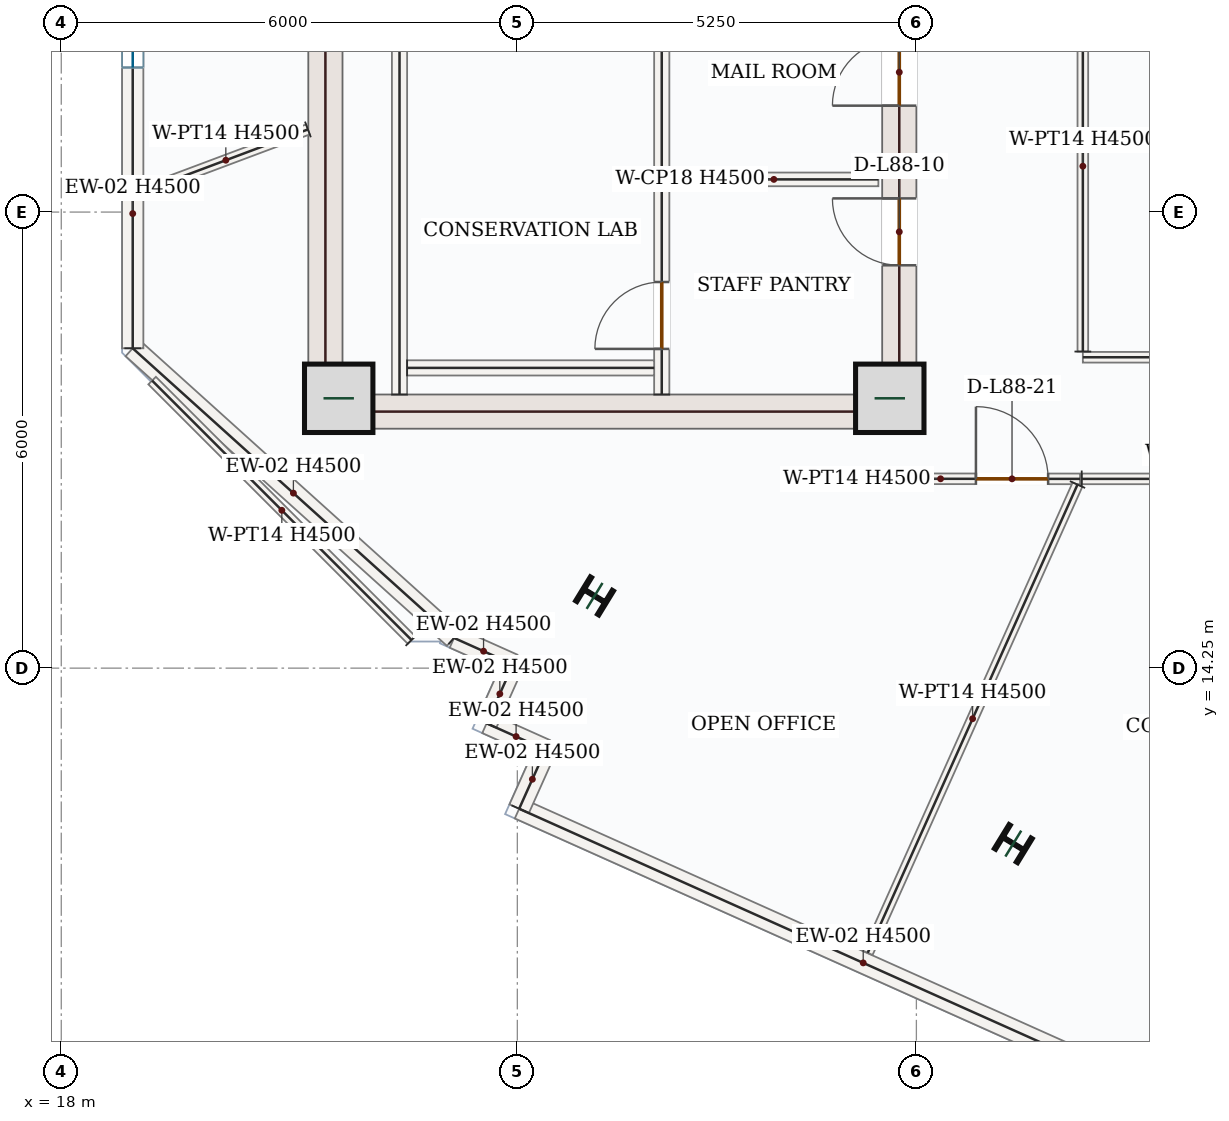
"""IFC4 building model, lengths in metres.
Left out: names, types, materials, properties, quantities, classifications, styles, units other than length and angle.
Written with IfcOpenShell. Run it as: python <this file> out.ifc"""

import sys

from ifc_helpers import new_model, si_unit, direction, frame, frame_2d, origin, origin_2d, place, context, subcontext, project, spatial, rectangle, i_section, extrude, source, transform, mapped, element, fill, save


model = new_model("IFC4")
c1 = context("Model", 3, precision=1e-05, world=origin(), true_north=direction((0.0, 1.0)))
c2 = subcontext(c1, "Body", "Model", "MODEL_VIEW")
j1 = project(units=[si_unit("LENGTHUNIT", "METRE"), si_unit("PLANEANGLEUNIT", "RADIAN")], contexts=[c1])
p1 = place(None, origin())
s1 = spatial("IfcSite", under=j1, at=p1, CompositionType="ELEMENT")
p2 = place(p1, origin())
s2 = spatial("IfcBuilding", under=s1, at=p2, CompositionType="ELEMENT")
p3 = place(p2, frame((0.0, 0.0, 361.05)))
s3 = spatial("IfcBuildingStorey", under=s2, at=p3, CompositionType="ELEMENT", Elevation=361.05)
m1 = source(origin(), c2, "Body", "SweptSolid", [
    extrude(rectangle(XDim=8.55, YDim=0.45, at=frame_2d((4.275, 0.0))), origin(), (0.0, 0.0, 1.0), 4.5),
])
p4 = place(p3, frame((21.475, 17.4, 0.0), z_axis=(0.0, 0.0, 1.0), x_axis=(0.0, 1.0, 0.0)))
e1 = element("IfcWall", 1, at=p4, inside=s3, PredefinedType="SHEAR", context=c2, shape_type="MappedRepresentation", body=[
    mapped(m1, transform((0.0, 0.0, 0.0), x_axis=(1.0, 0.0, 0.0), y_axis=(0.0, 1.0, 0.0), z_axis=(0.0, 0.0, 1.0), scale=1.0)),
])
p5 = place(p3, frame((29.025, 17.4, 0.0), z_axis=(0.0, 0.0, 1.0), x_axis=(0.0, 1.0, 0.0)))
e2 = element("IfcWall", 2, at=p5, inside=s3, PredefinedType="SHEAR", context=c2, shape_type="SweptSolid", body=[
    extrude(rectangle(XDim=8.55, YDim=0.45, at=frame_2d((4.275, 0.0))), origin(), (0.0, 0.0, 1.0), 4.5),
])
p6 = place(p5, frame((6.65, 0.0, 0.0)))
e3 = element("IfcOpeningElement", 3, at=p6, cuts=e2, PredefinedType="OPENING", context=c2, shape_type="SweptSolid", body=[
    extrude(rectangle(XDim=1.1, YDim=2.2, at=frame_2d((0.55, 1.1))), frame((0.0, 0.235, 0.0), z_axis=(0.0, -1.0, 0.0), x_axis=(1.0, 0.0, 0.0)), (0.0, 0.0, 1.0), 0.47),
])
p7 = place(p5, frame((2.15, 0.0, 0.0)))
e4 = element("IfcOpeningElement", 4, at=p7, cuts=e2, PredefinedType="OPENING", context=c2, shape_type="SweptSolid", body=[
    extrude(rectangle(XDim=0.88, YDim=2.1, at=frame_2d((0.44, 1.05))), frame((0.0, 0.235, 0.0), z_axis=(0.0, -1.0, 0.0), x_axis=(1.0, 0.0, 0.0)), (0.0, 0.0, 1.0), 0.47),
])
p8 = place(p5, frame((4.25, 0.0, 0.0)))
e5 = element("IfcOpeningElement", 5, at=p8, cuts=e2, PredefinedType="OPENING", context=c2, shape_type="SweptSolid", body=[
    extrude(rectangle(XDim=0.88, YDim=2.1, at=frame_2d((0.44, 1.05))), frame((0.0, 0.235, 0.0), z_axis=(0.0, -1.0, 0.0), x_axis=(1.0, 0.0, 0.0)), (0.0, 0.0, 1.0), 0.47),
])
m2 = source(origin(), c2, "Body", "SweptSolid", [
    extrude(rectangle(XDim=7.1, YDim=0.45, at=frame_2d((3.55, 0.0))), origin(), (0.0, 0.0, 1.0), 4.5),
])
p9 = place(p3, frame((21.7, 17.625, 0.0), z_axis=(0.0, 0.0, 1.0), x_axis=(1.0, 0.0, 0.0)))
e6 = element("IfcWall", 6, at=p9, inside=s3, PredefinedType="SHEAR", context=c2, shape_type="MappedRepresentation", body=[
    mapped(m2, transform((0.0, 0.0, 0.0), x_axis=(1.0, 0.0, 0.0), y_axis=(0.0, 1.0, 0.0), z_axis=(0.0, 0.0, 1.0), scale=1.0)),
])
m3 = source(origin(), c2, "Body", "SweptSolid", [
    extrude(rectangle(XDim=0.9, YDim=0.9, at=origin_2d()), origin(), (0.0, 0.0, 1.0), 4.8),
])
for number, where, z_axis, x_axis in (
    (7, (21.65, 17.8, 0.0), (0.0, 0.0, 1.0), (1.0, 0.0, 0.0)),
    (8, (28.9, 17.8, 0.0), (0.0, 0.0, 1.0), (1.0, 0.0, 0.0)),
):
    element("IfcColumn", number, at=place(p3, frame(where, z_axis=z_axis, x_axis=x_axis)), inside=s3, PredefinedType="COLUMN", context=c2, shape_type="MappedRepresentation", body=[
        mapped(m3, transform((0.0, 0.0, 0.0), x_axis=(1.0, 0.0, 0.0), y_axis=(0.0, 1.0, 0.0), z_axis=(0.0, 0.0, 1.0), scale=1.0)),
    ])
m4 = source(origin(), c2, "Body", "SweptSolid", [
    extrude(i_section(OverallWidth=0.369, OverallDepth=0.356, WebThickness=0.011, FlangeThickness=0.018, FilletRadius=0.018, at=origin_2d()), origin(), (0.0, 0.0, 1.0), 4.8),
])
for number, where, z_axis, x_axis in (
    (9, (25.016, 15.2, 0.0), (0.0, 0.0, 1.0), (0.522, 0.853, 0.0)),
    (10, (30.525, 11.942, 0.0), (0.0, 0.0, 1.0), (0.522, 0.853, 0.0)),
):
    element("IfcColumn", number, at=place(p3, frame(where, z_axis=z_axis, x_axis=x_axis)), inside=s3, PredefinedType="COLUMN", context=c2, shape_type="MappedRepresentation", body=[
        mapped(m4, transform((0.0, 0.0, 0.0), x_axis=(1.0, 0.0, 0.0), y_axis=(0.0, 1.0, 0.0), z_axis=(0.0, 0.0, 1.0), scale=1.0)),
    ])
m5 = source(origin(), c2, "Body", "SweptSolid", [
    extrude(rectangle(XDim=5.692, YDim=0.28, at=frame_2d((2.846, 0.0))), origin(), (0.0, 0.0, 1.0), 4.5),
])
p10 = place(p3, frame((23.168, 14.647, 0.0), z_axis=(0.0, 0.0, 1.0), x_axis=(-0.742767121681, 0.669549850981, 0.0)))
e11 = element("IfcWall", 11, at=p10, inside=s3, PredefinedType="SOLIDWALL", context=c2, shape_type="MappedRepresentation", body=[
    mapped(m5, transform((0.0, 0.0, 0.0), x_axis=(1.0, 0.0, 0.0), y_axis=(0.0, 1.0, 0.0), z_axis=(0.0, 0.0, 1.0), scale=1.0)),
])
p11 = place(p3, frame((18.94, 18.458, 0.0), z_axis=(0.0, 0.0, 1.0), x_axis=(0.0, 1.0, 0.0)))
e12 = element("IfcWall", 12, at=p11, inside=s3, PredefinedType="SOLIDWALL", context=c2, shape_type="SweptSolid", body=[
    extrude(rectangle(XDim=8.887, YDim=0.28, at=frame_2d((4.444, 0.0))), origin(), (0.0, 0.0, 1.0), 4.5),
])
p12 = place(p11, frame((3.694, 0.0, 0.85)))
e13 = element("IfcOpeningElement", 13, at=p12, cuts=e12, PredefinedType="OPENING", context=c2, shape_type="SweptSolid", body=[
    extrude(rectangle(XDim=1.5, YDim=1.5, at=frame_2d((0.75, 0.75))), frame((0.0, 0.15, 0.0), z_axis=(0.0, -1.0, 0.0), x_axis=(1.0, 0.0, 0.0)), (0.0, 0.0, 1.0), 0.3),
])
m6 = source(origin(), c2, "Body", "SweptSolid", [
    extrude(rectangle(XDim=9.92, YDim=0.28, at=frame_2d((4.96, 0.0))), origin(), (0.0, 0.0, 1.0), 4.5),
])
p13 = place(p3, frame((33.077, 8.344, 0.0), z_axis=(0.0, 0.0, 1.0), x_axis=(-0.91259673328, 0.408860859469, 0.0)))
e14 = element("IfcWall", 14, at=p13, inside=s3, PredefinedType="SOLIDWALL", context=c2, shape_type="MappedRepresentation", body=[
    mapped(m6, transform((0.0, 0.0, 0.0), x_axis=(1.0, 0.0, 0.0), y_axis=(0.0, 1.0, 0.0), z_axis=(0.0, 0.0, 1.0), scale=1.0)),
])
m7 = source(origin(), c2, "Body", "SweptSolid", [
    extrude(rectangle(XDim=0.85, YDim=0.28, at=frame_2d((0.425, 0.0))), origin(), (0.0, 0.0, 1.0), 4.5),
])
p14 = place(p3, frame((24.024, 12.4, 0.0), z_axis=(0.0, 0.0, 1.0), x_axis=(0.408775447691, 0.912634994598, 0.0)))
e15 = element("IfcWall", 15, at=p14, inside=s3, PredefinedType="SOLIDWALL", context=c2, shape_type="MappedRepresentation", body=[
    mapped(m7, transform((0.0, 0.0, 0.0), x_axis=(1.0, 0.0, 0.0), y_axis=(0.0, 1.0, 0.0), z_axis=(0.0, 0.0, 1.0), scale=1.0)),
])
m8 = source(origin(), c2, "Body", "SweptSolid", [
    extrude(rectangle(XDim=0.85, YDim=0.28, at=frame_2d((0.425, 0.0))), origin(), (0.0, 0.0, 1.0), 4.5),
])
p15 = place(p3, frame((24.372, 13.176, 0.0), z_axis=(0.0, 0.0, 1.0), x_axis=(-0.912527808644, 0.409014667771, 0.0)))
e16 = element("IfcWall", 16, at=p15, inside=s3, PredefinedType="SOLIDWALL", context=c2, shape_type="MappedRepresentation", body=[
    mapped(m8, transform((0.0, 0.0, 0.0), x_axis=(1.0, 0.0, 0.0), y_axis=(0.0, 1.0, 0.0), z_axis=(0.0, 0.0, 1.0), scale=1.0)),
])
p16 = place(p3, frame((23.596, 13.524, 0.0), z_axis=(0.0, 0.0, 1.0), x_axis=(0.408775447691, 0.912634994598, 0.0)))
e17 = element("IfcWall", 17, at=p16, inside=s3, PredefinedType="SOLIDWALL", context=c2, shape_type="MappedRepresentation", body=[
    mapped(m7, transform((0.0, 0.0, 0.0), x_axis=(1.0, 0.0, 0.0), y_axis=(0.0, 1.0, 0.0), z_axis=(0.0, 0.0, 1.0), scale=1.0)),
])
p17 = place(p3, frame((23.943, 14.299, 0.0), z_axis=(0.0, 0.0, 1.0), x_axis=(-0.912527808644, 0.409014667771, 0.0)))
e18 = element("IfcWall", 18, at=p17, inside=s3, PredefinedType="SOLIDWALL", context=c2, shape_type="MappedRepresentation", body=[
    mapped(m8, transform((0.0, 0.0, 0.0), x_axis=(1.0, 0.0, 0.0), y_axis=(0.0, 1.0, 0.0), z_axis=(0.0, 0.0, 1.0), scale=1.0)),
])
m9 = source(origin(), c2, "Body", "SweptSolid", [
    extrude(rectangle(XDim=7.87, YDim=0.2, at=frame_2d((3.935, 0.0))), origin(), (0.0, 0.0, 1.0), 4.5),
])
p18 = place(p3, frame((22.45, 17.85, 0.0), z_axis=(0.0, 0.0, 1.0), x_axis=(0.0, 1.0, 0.0)))
e19 = element("IfcWall", 19, at=p18, inside=s3, PredefinedType="SOLIDWALL", context=c2, shape_type="MappedRepresentation", body=[
    mapped(m9, transform((0.0, 0.0, 0.0), x_axis=(1.0, 0.0, 0.0), y_axis=(0.0, 1.0, 0.0), z_axis=(0.0, 0.0, 1.0), scale=1.0)),
])
p19 = place(p3, frame((25.9, 17.85, 0.0), z_axis=(0.0, 0.0, 1.0), x_axis=(0.0, 1.0, 0.0)))
e20 = element("IfcWall", 20, at=p19, inside=s3, PredefinedType="SOLIDWALL", context=c2, shape_type="SweptSolid", body=[
    extrude(rectangle(XDim=8.0, YDim=0.2, at=frame_2d((4.0, 0.0))), origin(), (0.0, 0.0, 1.0), 4.5),
])
p20 = place(p19, frame((6.2, 0.0, 0.0)))
e21 = element("IfcOpeningElement", 21, at=p20, cuts=e20, PredefinedType="OPENING", context=c2, shape_type="SweptSolid", body=[
    extrude(rectangle(XDim=1.0, YDim=2.15, at=frame_2d((0.5, 1.075))), frame((0.0, 0.11, 0.0), z_axis=(0.0, -1.0, 0.0), x_axis=(1.0, 0.0, 0.0)), (0.0, 0.0, 1.0), 0.22),
])
p21 = place(p19, frame((0.6, 0.0, 0.0)))
e22 = element("IfcOpeningElement", 22, at=p21, cuts=e20, PredefinedType="OPENING", context=c2, shape_type="SweptSolid", body=[
    extrude(rectangle(XDim=0.88, YDim=2.1, at=frame_2d((0.44, 1.05))), frame((0.0, 0.11, 0.0), z_axis=(0.0, -1.0, 0.0), x_axis=(1.0, 0.0, 0.0)), (0.0, 0.0, 1.0), 0.22),
])
m10 = source(origin(), c2, "Body", "SweptSolid", [
    extrude(rectangle(XDim=3.25, YDim=0.2, at=frame_2d((1.625, 0.0))), origin(), (0.0, 0.0, 1.0), 4.5),
])
p22 = place(p3, frame((22.55, 18.2, 0.0), z_axis=(0.0, 0.0, 1.0), x_axis=(1.0, 0.0, 0.0)))
e23 = element("IfcWall", 23, at=p22, inside=s3, PredefinedType="SOLIDWALL", context=c2, shape_type="MappedRepresentation", body=[
    mapped(m10, transform((0.0, 0.0, 0.0), x_axis=(1.0, 0.0, 0.0), y_axis=(0.0, 1.0, 0.0), z_axis=(0.0, 0.0, 1.0), scale=1.0)),
])
m11 = source(origin(), c2, "Body", "SweptSolid", [
    extrude(rectangle(XDim=2.75, YDim=0.18, at=frame_2d((1.375, 0.0))), origin(), (0.0, 0.0, 1.0), 4.5),
])
p23 = place(p3, frame((26.0, 20.68, 0.0), z_axis=(0.0, 0.0, 1.0), x_axis=(1.0, 0.0, 0.0)))
e24 = element("IfcWall", 24, at=p23, inside=s3, PredefinedType="PARTITIONING", context=c2, shape_type="MappedRepresentation", body=[
    mapped(m11, transform((0.0, 0.0, 0.0), x_axis=(1.0, 0.0, 0.0), y_axis=(0.0, 1.0, 0.0), z_axis=(0.0, 0.0, 1.0), scale=1.0)),
])
m12 = source(origin(), c2, "Body", "SweptSolid", [
    extrude(rectangle(XDim=2.307, YDim=0.14, at=frame_2d((1.154, 0.0))), origin(), (0.0, 0.0, 1.0), 4.5),
])
p24 = place(p3, frame((21.245, 21.337, 0.0), z_axis=(0.0, 0.0, 1.0), x_axis=(-0.936329177569, -0.351123441588, 0.0)))
e25 = element("IfcWall", 25, at=p24, inside=s3, PredefinedType="PARTITIONING", context=c2, shape_type="MappedRepresentation", body=[
    mapped(m12, transform((0.0, 0.0, 0.0), x_axis=(1.0, 0.0, 0.0), y_axis=(0.0, 1.0, 0.0), z_axis=(0.0, 0.0, 1.0), scale=1.0)),
])
m13 = source(origin(), c2, "Body", "SweptSolid", [
    extrude(rectangle(XDim=4.47, YDim=0.14, at=frame_2d((2.235, 0.0))), origin(), (0.0, 0.0, 1.0), 4.5),
])
p25 = place(p3, frame((35.91, 18.34, 0.0), z_axis=(0.0, 0.0, 1.0), x_axis=(-1.0, 0.0, 0.0)))
e26 = element("IfcWall", 26, at=p25, inside=s3, PredefinedType="PARTITIONING", context=c2, shape_type="MappedRepresentation", body=[
    mapped(m13, transform((0.0, 0.0, 0.0), x_axis=(1.0, 0.0, 0.0), y_axis=(0.0, 1.0, 0.0), z_axis=(0.0, 0.0, 1.0), scale=1.0)),
])
p26 = place(p3, frame((31.44, 18.415, 0.0), z_axis=(0.0, 0.0, 1.0), x_axis=(0.0, 1.0, 0.0)))
e27 = element("IfcWall", 27, at=p26, inside=s3, PredefinedType="PARTITIONING", context=c2, shape_type="SweptSolid", body=[
    extrude(rectangle(XDim=7.395, YDim=0.14, at=frame_2d((3.698, 0.0))), origin(), (0.0, 0.0, 1.0), 4.5),
])
p27 = place(p26, frame((5.027, 0.0, 0.0)))
e28 = element("IfcOpeningElement", 28, at=p27, cuts=e27, PredefinedType="OPENING", context=c2, shape_type="SweptSolid", body=[
    extrude(rectangle(XDim=0.95, YDim=2.15, at=frame_2d((0.475, 1.075))), frame((0.0, 0.08, 0.0), z_axis=(0.0, -1.0, 0.0), x_axis=(1.0, 0.0, 0.0)), (0.0, 0.0, 1.0), 0.16),
])
p28 = place(p3, frame((29.253, 16.741, 0.0), z_axis=(0.0, 0.0, 1.0), x_axis=(0.999999838805, -0.000567794594, 0.0)))
e29 = element("IfcWall", 29, at=p28, inside=s3, PredefinedType="PARTITIONING", context=c2, shape_type="SweptSolid", body=[
    extrude(rectangle(XDim=2.15, YDim=0.14, at=frame_2d((1.075, 0.0))), origin(), (0.0, 0.0, 1.0), 4.5),
])
p29 = place(p28, frame((0.78, 0.0, 0.0)))
e30 = element("IfcOpeningElement", 30, at=p29, cuts=e29, PredefinedType="OPENING", context=c2, shape_type="SweptSolid", body=[
    extrude(rectangle(XDim=0.95, YDim=2.15, at=frame_2d((0.475, 1.075))), frame((0.0, 0.08, 0.0), z_axis=(0.0, -1.0, 0.0), x_axis=(1.0, 0.0, 0.0)), (0.0, 0.0, 1.0), 0.16),
])
m14 = source(origin(), c2, "Body", "SweptSolid", [
    extrude(rectangle(XDim=6.75, YDim=0.14, at=frame_2d((3.375, 0.0))), origin(), (0.0, 0.0, 1.0), 4.5),
])
p30 = place(p3, frame((31.37, 16.665, 0.0), z_axis=(0.0, 0.0, 1.0), x_axis=(-0.408861688893, -0.912596361682, 0.0)))
e31 = element("IfcWall", 31, at=p30, inside=s3, PredefinedType="PARTITIONING", context=c2, shape_type="MappedRepresentation", body=[
    mapped(m14, transform((0.0, 0.0, 0.0), x_axis=(1.0, 0.0, 0.0), y_axis=(0.0, 1.0, 0.0), z_axis=(0.0, 0.0, 1.0), scale=1.0)),
])
m15 = source(origin(), c2, "Body", "SweptSolid", [
    extrude(rectangle(XDim=4.826, YDim=0.14, at=frame_2d((2.413, 0.0))), origin(), (0.0, 0.0, 1.0), 4.5),
])
p31 = place(p3, frame((22.608, 14.62, 0.0), z_axis=(0.0, 0.0, 1.0), x_axis=(-0.707081488078, 0.70713207339, 0.0)))
e32 = element("IfcWall", 32, at=p31, inside=s3, PredefinedType="PARTITIONING", context=c2, shape_type="MappedRepresentation", body=[
    mapped(m15, transform((0.0, 0.0, 0.0), x_axis=(1.0, 0.0, 0.0), y_axis=(0.0, 1.0, 0.0), z_axis=(0.0, 0.0, 1.0), scale=1.0)),
])
p32 = place(p3, frame((31.425, 16.74, 0.0), z_axis=(0.0, 0.0, 1.0), x_axis=(1.0, 0.0, 0.0)))
e33 = element("IfcWall", 33, at=p32, inside=s3, PredefinedType="PARTITIONING", context=c2, shape_type="SweptSolid", body=[
    extrude(rectangle(XDim=8.472, YDim=0.14, at=frame_2d((4.236, 0.0))), origin(), (0.0, 0.0, 1.0), 4.5),
])
p33 = place(p32, frame((3.761, 0.0, 0.0)))
e34 = element("IfcOpeningElement", 34, at=p33, cuts=e33, PredefinedType="OPENING", context=c2, shape_type="SweptSolid", body=[
    extrude(rectangle(XDim=0.95, YDim=2.15, at=frame_2d((0.475, 1.075))), frame((0.0, 0.08, 0.0), z_axis=(0.0, -1.0, 0.0), x_axis=(1.0, 0.0, 0.0)), (0.0, 0.0, 1.0), 0.16),
])
m16 = source(origin(), c2, "Body", "SweptSolid", [
    extrude(rectangle(XDim=1.5, YDim=1.5, at=frame_2d((0.75, 0.75))), frame((0.0, 0.03, 0.0), z_axis=(0.0, -1.0, 0.0), x_axis=(1.0, 0.0, 0.0)), (0.0, 0.0, 1.0), 0.06),
])
p34 = place(p12, origin())
e35 = element("IfcWindow", 35, at=p34, inside=s3, PartitioningType="SINGLE_PANEL", PredefinedType="WINDOW", context=c2, shape_type="MappedRepresentation", body=[
    mapped(m16, transform((0.0, 0.0, 0.0), x_axis=(1.0, 0.0, 0.0), y_axis=(0.0, 1.0, 0.0), z_axis=(0.0, 0.0, 1.0), scale=1.0)),
])
fill(e13, e35)
m17 = source(origin(), c2, "Body", "SweptSolid", [
    extrude(rectangle(XDim=0.88, YDim=2.1, at=frame_2d((0.44, 1.05))), frame((0.0, 0.025, 0.0), z_axis=(0.0, -1.0, 0.0), x_axis=(1.0, 0.0, 0.0)), (0.0, 0.0, 1.0), 0.05),
])
p35 = place(p21, origin())
e36 = element("IfcDoor", 36, at=p35, inside=s3, OperationType="SINGLE_SWING_LEFT", PredefinedType="DOOR", context=c2, shape_type="MappedRepresentation", body=[
    mapped(m17, transform((0.0, 0.0, 0.0), x_axis=(1.0, 0.0, 0.0), y_axis=(0.0, 1.0, 0.0), z_axis=(0.0, 0.0, 1.0), scale=1.0)),
])
fill(e22, e36)
p36 = place(p7, origin())
e37 = element("IfcDoor", 37, at=p36, inside=s3, OperationType="SINGLE_SWING_RIGHT", PredefinedType="DOOR", context=c2, shape_type="MappedRepresentation", body=[
    mapped(m17, transform((0.0, 0.0, 0.0), x_axis=(1.0, 0.0, 0.0), y_axis=(0.0, 1.0, 0.0), z_axis=(0.0, 0.0, 1.0), scale=1.0)),
])
fill(e4, e37)
p37 = place(p8, origin())
e38 = element("IfcDoor", 38, at=p37, inside=s3, OperationType="SINGLE_SWING_LEFT", PredefinedType="DOOR", context=c2, shape_type="MappedRepresentation", body=[
    mapped(m17, transform((0.0, 0.0, 0.0), x_axis=(1.0, 0.0, 0.0), y_axis=(0.0, 1.0, 0.0), z_axis=(0.0, 0.0, 1.0), scale=1.0)),
])
fill(e5, e38)
m18 = source(origin(), c2, "Body", "SweptSolid", [
    extrude(rectangle(XDim=0.95, YDim=2.15, at=frame_2d((0.475, 1.075))), frame((0.0, 0.025, 0.0), z_axis=(0.0, -1.0, 0.0), x_axis=(1.0, 0.0, 0.0)), (0.0, 0.0, 1.0), 0.05),
])
p38 = place(p29, origin())
e39 = element("IfcDoor", 39, at=p38, inside=s3, OperationType="SINGLE_SWING_LEFT", PredefinedType="DOOR", context=c2, shape_type="MappedRepresentation", body=[
    mapped(m18, transform((0.0, 0.0, 0.0), x_axis=(1.0, 0.0, 0.0), y_axis=(0.0, 1.0, 0.0), z_axis=(0.0, 0.0, 1.0), scale=1.0)),
])
fill(e30, e39)
save(model, sys.argv[1])
